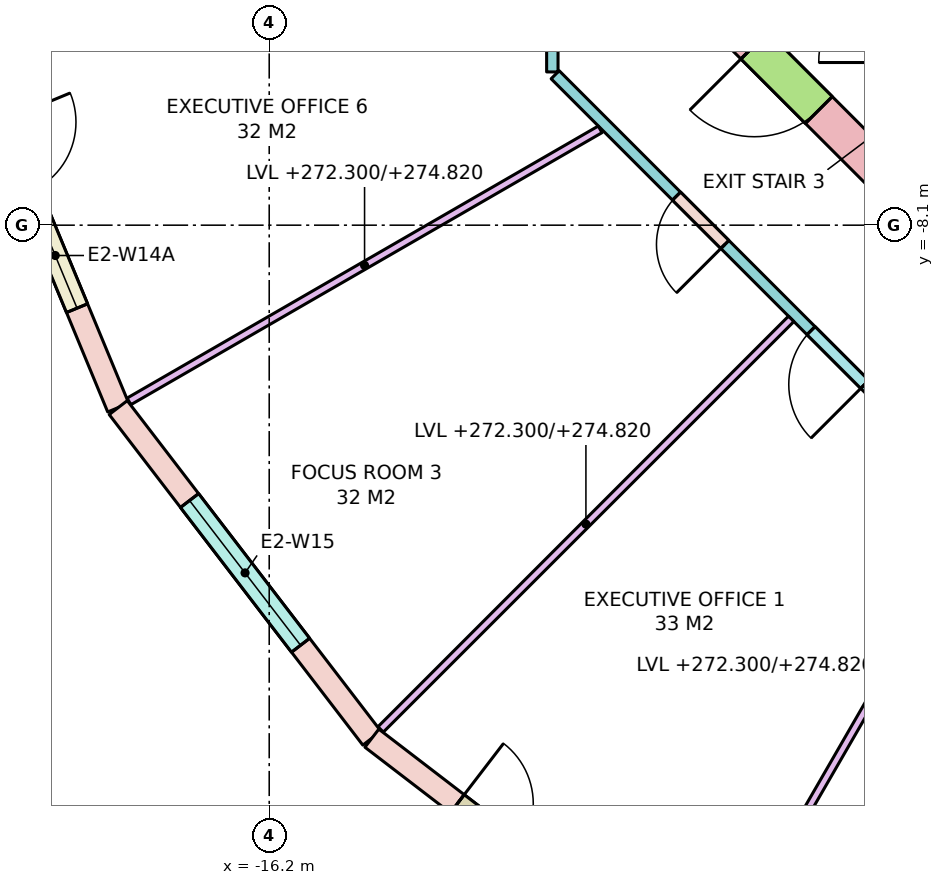
"""IFC4 building model, lengths in metres.
Left out: names, types, materials, properties, quantities, classifications, styles, units other than length and angle.
Written with IfcOpenShell. Run it as: python <this file> out.ifc"""

import sys

from ifc_helpers import new_model, si_unit, direction, frame, frame_2d, origin, place, context, subcontext, project, spatial, rectangle, extrude, element, fill, save


model = new_model("IFC4")
c1 = context("Model", 3, precision=1e-05, world=origin(), true_north=direction((0.0, 1.0)))
c2 = subcontext(c1, "Body", "Model", "MODEL_VIEW")
j1 = project(units=[si_unit("LENGTHUNIT", "METRE"), si_unit("PLANEANGLEUNIT", "RADIAN")], contexts=[c1])
p1 = place(None, origin())
s1 = spatial("IfcSite", under=j1, at=p1, CompositionType="ELEMENT")
p2 = place(p1, origin())
s2 = spatial("IfcBuilding", under=s1, at=p2, CompositionType="ELEMENT")
p3 = place(p2, frame((0.0, 0.0, 272.3)))
s3 = spatial("IfcBuildingStorey", under=s2, at=p3, CompositionType="ELEMENT", Elevation=272.3)
p4 = place(p3, frame((-7.277, -8.277, -0.28), z_axis=(0.0, 0.0, 1.0), x_axis=(-0.707106781187, 0.707106781187, 0.0)))
e1 = element("IfcWall", 1, at=p4, inside=s3, PredefinedType="SHEAR", context=c2, shape_type="SweptSolid", body=[
    extrude(rectangle(XDim=4.243, YDim=0.5, at=frame_2d((2.121, 0.0))), origin(), (0.0, 0.0, 1.0), 3.7),
])
p5 = place(p4, frame((2.393, 0.0, 0.28)))
e2 = element("IfcOpeningElement", 2, at=p5, cuts=e1, PredefinedType="OPENING", context=c2, shape_type="SweptSolid", body=[
    extrude(rectangle(XDim=1.2, YDim=2.1, at=frame_2d((0.6, 1.05))), frame((0.0, 0.26, 0.0), z_axis=(0.0, -1.0, 0.0), x_axis=(1.0, 0.0, 0.0)), (0.0, 0.0, 1.0), 0.52),
])
p6 = place(p3, frame((-20.284, -5.435, 0.0), z_axis=(0.0, 0.0, 1.0), x_axis=(0.382688740813, -0.923877333662, 0.0)))
e3 = element("IfcWall", 3, at=p6, inside=s3, PredefinedType="STANDARD", context=c2, shape_type="SweptSolid", body=[
    extrude(rectangle(XDim=5.482, YDim=0.3, at=frame_2d((2.741, 0.0))), origin(), (0.0, 0.0, 1.0), 3.42),
])
p7 = place(p6, frame((1.416, 0.0, 0.0)))
e4 = element("IfcOpeningElement", 4, at=p7, cuts=e3, PredefinedType="OPENING", context=c2, shape_type="SweptSolid", body=[
    extrude(rectangle(XDim=1.0, YDim=2.4, at=frame_2d((0.5, 1.2))), frame((0.0, 0.16, 0.0), z_axis=(0.0, -1.0, 0.0), x_axis=(1.0, 0.0, 0.0)), (0.0, 0.0, 1.0), 0.32),
])
p8 = place(p6, frame((2.566, 0.0, 0.8)))
e5 = element("IfcOpeningElement", 5, at=p8, cuts=e3, PredefinedType="OPENING", context=c2, shape_type="SweptSolid", body=[
    extrude(rectangle(XDim=1.5, YDim=2.4, at=frame_2d((0.75, 1.2))), frame((0.0, 0.16, 0.0), z_axis=(0.0, -1.0, 0.0), x_axis=(1.0, 0.0, 0.0)), (0.0, 0.0, 1.0), 0.32),
])
p9 = place(p3, frame((-18.187, -10.5, 0.0), z_axis=(0.0, 0.0, 1.0), x_axis=(0.608784891166, -0.793335336593, 0.0)))
e6 = element("IfcWall", 6, at=p9, inside=s3, PredefinedType="STANDARD", context=c2, shape_type="SweptSolid", body=[
    extrude(rectangle(XDim=5.482, YDim=0.3, at=frame_2d((2.741, 0.0))), origin(), (0.0, 0.0, 1.0), 3.42),
])
p10 = place(p9, frame((1.541, 0.0, 0.8)))
e7 = element("IfcOpeningElement", 7, at=p10, cuts=e6, PredefinedType="OPENING", context=c2, shape_type="SweptSolid", body=[
    extrude(rectangle(XDim=2.4, YDim=2.4, at=frame_2d((1.2, 1.2))), frame((0.0, 0.16, 0.0), z_axis=(0.0, -1.0, 0.0), x_axis=(1.0, 0.0, 0.0)), (0.0, 0.0, 1.0), 0.32),
])
p11 = place(p3, frame((-14.849, -14.849, 0.0), z_axis=(0.0, 0.0, 1.0), x_axis=(0.793335336593, -0.608784891166, 0.0)))
e8 = element("IfcWall", 8, at=p11, inside=s3, PredefinedType="STANDARD", context=c2, shape_type="SweptSolid", body=[
    extrude(rectangle(XDim=5.482, YDim=0.3, at=frame_2d((2.741, 0.0))), origin(), (0.0, 0.0, 1.0), 3.42),
])
p12 = place(p11, frame((1.416, 0.0, 0.0)))
e9 = element("IfcOpeningElement", 9, at=p12, cuts=e8, PredefinedType="OPENING", context=c2, shape_type="SweptSolid", body=[
    extrude(rectangle(XDim=1.0, YDim=2.4, at=frame_2d((0.5, 1.2))), frame((0.0, 0.16, 0.0), z_axis=(0.0, -1.0, 0.0), x_axis=(1.0, 0.0, 0.0)), (0.0, 0.0, 1.0), 0.32),
])
p13 = place(p11, frame((2.566, 0.0, 0.8)))
e10 = element("IfcOpeningElement", 10, at=p13, cuts=e8, PredefinedType="OPENING", context=c2, shape_type="SweptSolid", body=[
    extrude(rectangle(XDim=1.5, YDim=2.4, at=frame_2d((0.75, 1.2))), frame((0.0, 0.16, 0.0), z_axis=(0.0, -1.0, 0.0), x_axis=(1.0, 0.0, 0.0)), (0.0, 0.0, 1.0), 0.32),
])
p14 = place(p3, frame((-8.121, -10.438, 0.0), z_axis=(0.0, 0.0, 1.0), x_axis=(-0.707106781187, 0.707106781187, 0.0)))
e11 = element("IfcWall", 11, at=p14, inside=s3, PredefinedType="PARTITIONING", context=c2, shape_type="SweptSolid", body=[
    extrude(rectangle(XDim=6.105, YDim=0.15, at=frame_2d((3.053, 0.0))), origin(), (0.0, 0.0, 1.0), 2.52),
])
p15 = place(p14, frame((0.344, 0.0, 0.0)))
e12 = element("IfcOpeningElement", 12, at=p15, cuts=e11, PredefinedType="OPENING", context=c2, shape_type="SweptSolid", body=[
    extrude(rectangle(XDim=1.0, YDim=2.1, at=frame_2d((0.5, 1.05))), frame((0.0, 0.085, 0.0), z_axis=(0.0, -1.0, 0.0), x_axis=(1.0, 0.0, 0.0)), (0.0, 0.0, 1.0), 0.17),
])
p16 = place(p14, frame((2.948, 0.0, 0.0)))
e13 = element("IfcOpeningElement", 13, at=p16, cuts=e11, PredefinedType="OPENING", context=c2, shape_type="SweptSolid", body=[
    extrude(rectangle(XDim=0.9, YDim=2.1, at=frame_2d((0.45, 1.05))), frame((0.0, 0.085, 0.0), z_axis=(0.0, -1.0, 0.0), x_axis=(1.0, 0.0, 0.0)), (0.0, 0.0, 1.0), 0.17),
])
p17 = place(p3, frame((-12.475, -6.084, 0.0), z_axis=(0.0, 0.0, 1.0), x_axis=(0.0, 1.0, 0.0)))
e14 = element("IfcWall", 14, at=p17, inside=s3, PredefinedType="PARTITIONING", context=c2, shape_type="SweptSolid", body=[
    extrude(rectangle(XDim=12.167, YDim=0.15, at=frame_2d((6.084, 0.0))), origin(), (0.0, 0.0, 1.0), 2.52),
])
p18 = place(p17, frame((10.272, 0.0, 0.0)))
e15 = element("IfcOpeningElement", 15, at=p18, cuts=e14, PredefinedType="OPENING", context=c2, shape_type="SweptSolid", body=[
    extrude(rectangle(XDim=1.0, YDim=2.1, at=frame_2d((0.5, 1.05))), frame((0.0, 0.085, 0.0), z_axis=(0.0, -1.0, 0.0), x_axis=(1.0, 0.0, 0.0)), (0.0, 0.0, 1.0), 0.17),
])
p19 = place(p17, frame((7.306, 0.0, 0.0)))
e16 = element("IfcOpeningElement", 16, at=p19, cuts=e14, PredefinedType="OPENING", context=c2, shape_type="SweptSolid", body=[
    extrude(rectangle(XDim=0.9, YDim=2.1, at=frame_2d((0.45, 1.05))), frame((0.0, 0.085, 0.0), z_axis=(0.0, -1.0, 0.0), x_axis=(1.0, 0.0, 0.0)), (0.0, 0.0, 1.0), 0.17),
])
p20 = place(p17, frame((3.961, 0.0, 0.0)))
e17 = element("IfcOpeningElement", 17, at=p20, cuts=e14, PredefinedType="OPENING", context=c2, shape_type="SweptSolid", body=[
    extrude(rectangle(XDim=0.9, YDim=2.1, at=frame_2d((0.45, 1.05))), frame((0.0, 0.085, 0.0), z_axis=(0.0, -1.0, 0.0), x_axis=(1.0, 0.0, 0.0)), (0.0, 0.0, 1.0), 0.17),
])
p21 = place(p17, frame((0.896, 0.0, 0.0)))
e18 = element("IfcOpeningElement", 18, at=p21, cuts=e14, PredefinedType="OPENING", context=c2, shape_type="SweptSolid", body=[
    extrude(rectangle(XDim=1.0, YDim=2.1, at=frame_2d((0.5, 1.05))), frame((0.0, 0.085, 0.0), z_axis=(0.0, -1.0, 0.0), x_axis=(1.0, 0.0, 0.0)), (0.0, 0.0, 1.0), 0.17),
])
p22 = place(p3, frame((-11.846, -6.839, 0.0), z_axis=(0.0, 0.0, 1.0), x_axis=(-0.866011787705, -0.500023583, 0.0)))
e19 = element("IfcWall", 19, at=p22, inside=s3, PredefinedType="PARTITIONING", context=c2, shape_type="SweptSolid", body=[
    extrude(rectangle(XDim=7.158, YDim=0.1, at=frame_2d((3.579, 0.0))), origin(), (0.0, 0.0, 1.0), 2.52),
])
p23 = place(p3, frame((-9.333, -9.333, 0.0), z_axis=(0.0, 0.0, 1.0), x_axis=(-0.707106781187, -0.707106781187, 0.0)))
e20 = element("IfcWall", 20, at=p23, inside=s3, PredefinedType="PARTITIONING", context=c2, shape_type="SweptSolid", body=[
    extrude(rectangle(XDim=7.639, YDim=0.1, at=frame_2d((3.819, 0.0))), origin(), (0.0, 0.0, 1.0), 2.52),
])
p24 = place(p3, frame((-6.105, -10.575, 0.0), z_axis=(0.0, 0.0, 1.0), x_axis=(-0.50001399067, -0.866017326117, 0.0)))
e21 = element("IfcWall", 21, at=p24, inside=s3, PredefinedType="PARTITIONING", context=c2, shape_type="SweptSolid", body=[
    extrude(rectangle(XDim=8.626, YDim=0.1, at=frame_2d((4.313, 0.0))), origin(), (0.0, 0.0, 1.0), 2.52),
])
p25 = place(p8, origin())
e22 = element("IfcWindow", 22, at=p25, inside=s3, PartitioningType="SINGLE_PANEL", PredefinedType="WINDOW", context=c2, shape_type="SweptSolid", body=[
    extrude(rectangle(XDim=1.5, YDim=2.4, at=frame_2d((0.75, 1.2))), frame((0.0, 0.03, 0.0), z_axis=(0.0, -1.0, 0.0), x_axis=(1.0, 0.0, 0.0)), (0.0, 0.0, 1.0), 0.06),
])
fill(e5, e22)
p26 = place(p10, origin())
e23 = element("IfcWindow", 23, at=p26, inside=s3, PartitioningType="SINGLE_PANEL", PredefinedType="WINDOW", context=c2, shape_type="SweptSolid", body=[
    extrude(rectangle(XDim=2.4, YDim=2.4, at=frame_2d((1.2, 1.2))), frame((0.0, 0.03, 0.0), z_axis=(0.0, -1.0, 0.0), x_axis=(1.0, 0.0, 0.0)), (0.0, 0.0, 1.0), 0.06),
])
fill(e7, e23)
p27 = place(p12, origin())
e24 = element("IfcDoor", 24, at=p27, inside=s3, OperationType="SINGLE_SWING_LEFT", PredefinedType="DOOR", context=c2, shape_type="SweptSolid", body=[
    extrude(rectangle(XDim=1.0, YDim=2.4, at=frame_2d((0.5, 1.2))), frame((0.0, 0.025, 0.0), z_axis=(0.0, -1.0, 0.0), x_axis=(1.0, 0.0, 0.0)), (0.0, 0.0, 1.0), 0.05),
])
fill(e9, e24)
p28 = place(p5, origin())
e25 = element("IfcDoor", 25, at=p28, inside=s3, OperationType="SINGLE_SWING_RIGHT", PredefinedType="DOOR", context=c2, shape_type="SweptSolid", body=[
    extrude(rectangle(XDim=1.2, YDim=2.1, at=frame_2d((0.6, 1.05))), frame((0.0, 0.025, 0.0), z_axis=(0.0, -1.0, 0.0), x_axis=(1.0, 0.0, 0.0)), (0.0, 0.0, 1.0), 0.05),
])
fill(e2, e25)
p29 = place(p15, origin())
e26 = element("IfcDoor", 26, at=p29, inside=s3, OperationType="SINGLE_SWING_LEFT", PredefinedType="DOOR", context=c2, shape_type="SweptSolid", body=[
    extrude(rectangle(XDim=1.0, YDim=2.1, at=frame_2d((0.5, 1.05))), frame((0.0, 0.025, 0.0), z_axis=(0.0, -1.0, 0.0), x_axis=(1.0, 0.0, 0.0)), (0.0, 0.0, 1.0), 0.05),
])
fill(e12, e26)
p30 = place(p16, origin())
e27 = element("IfcDoor", 27, at=p30, inside=s3, OperationType="SINGLE_SWING_LEFT", PredefinedType="DOOR", context=c2, shape_type="SweptSolid", body=[
    extrude(rectangle(XDim=0.9, YDim=2.1, at=frame_2d((0.45, 1.05))), frame((0.0, 0.025, 0.0), z_axis=(0.0, -1.0, 0.0), x_axis=(1.0, 0.0, 0.0)), (0.0, 0.0, 1.0), 0.05),
])
fill(e13, e27)
save(model, sys.argv[1])
